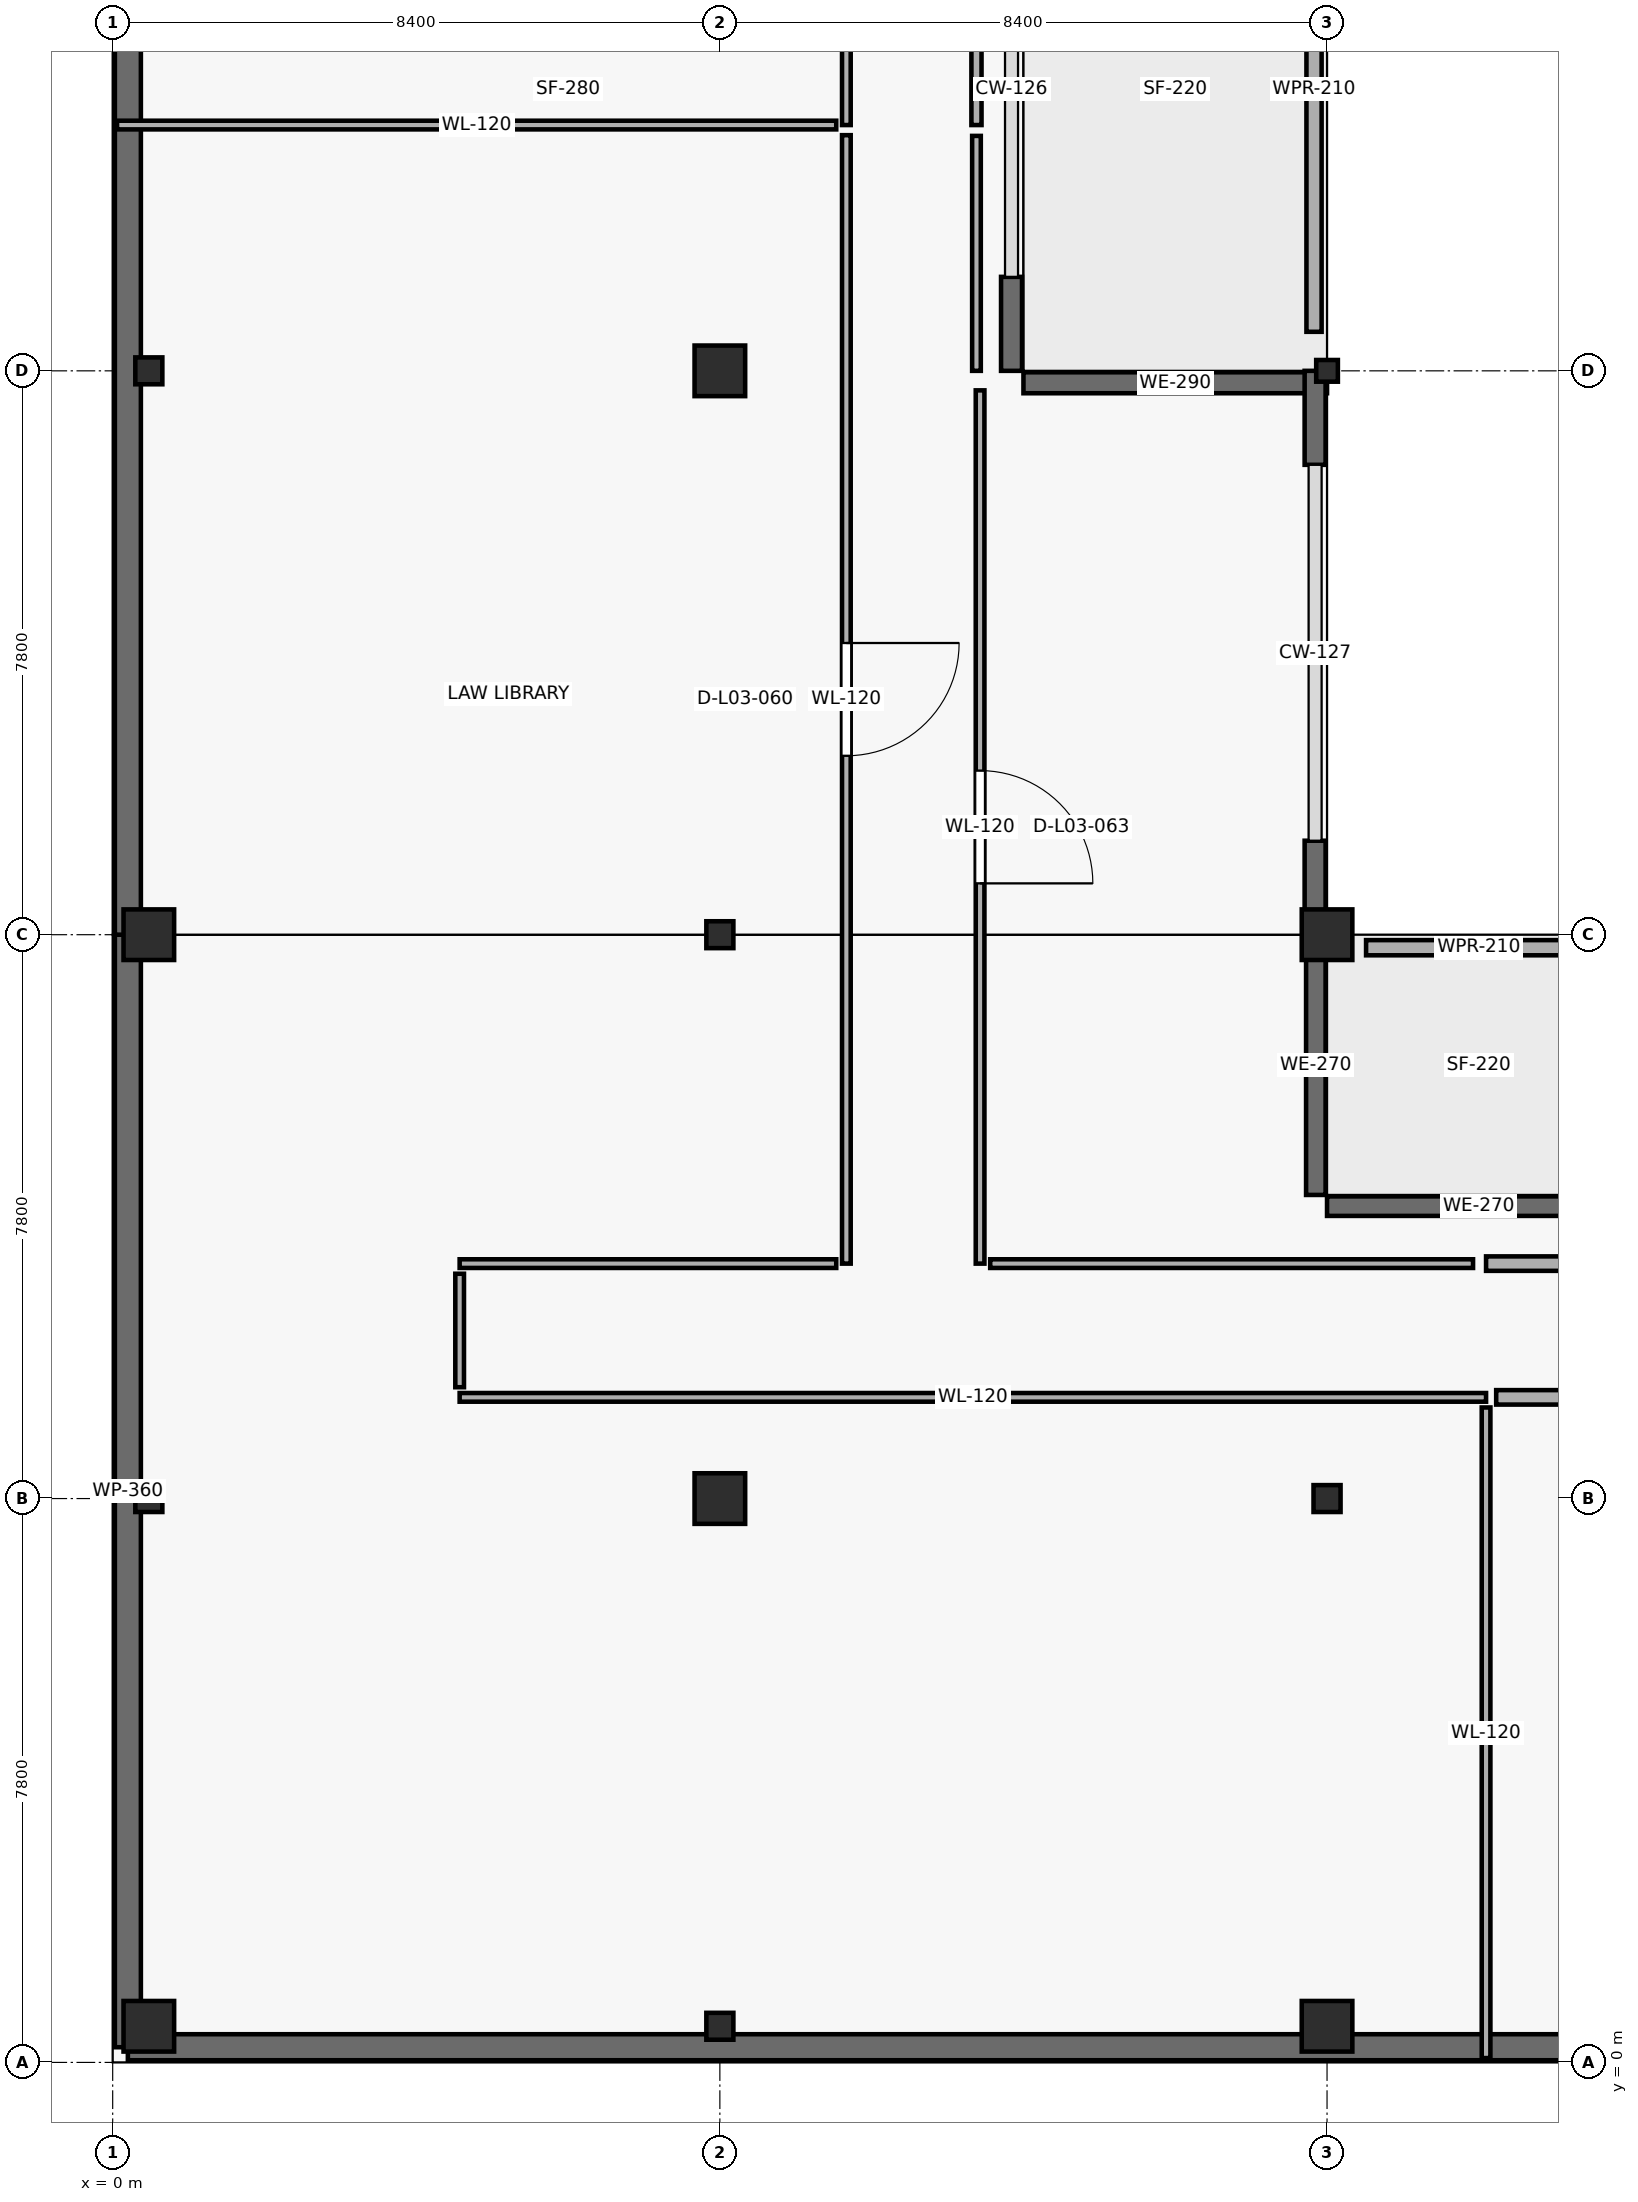
"""IFC4 building model, lengths in metres.
Left out: names, types, materials, properties, quantities, classifications, styles, units other than length and angle.
Written with IfcOpenShell. Run it as: python <this file> out.ifc"""

import sys

from ifc_helpers import new_model, si_unit, direction, frame, frame_2d, origin, origin_2d, place, context, subcontext, project, spatial, rectangle, hollow_rectangle, i_section, extrude, element, fill, save


model = new_model("IFC4")
c1 = context("Model", 3, precision=1e-05, world=origin(), true_north=direction((0.0, 1.0)))
c2 = subcontext(c1, "Body", "Model", "MODEL_VIEW")
j1 = project(units=[si_unit("LENGTHUNIT", "METRE"), si_unit("PLANEANGLEUNIT", "RADIAN")], contexts=[c1])
p1 = place(None, origin())
s1 = spatial("IfcSite", under=j1, at=p1, CompositionType="ELEMENT")
p2 = place(p1, origin())
s2 = spatial("IfcBuilding", under=s1, at=p2, CompositionType="ELEMENT")
p3 = place(p2, frame((0.0, 0.0, 10.2)))
s3 = spatial("IfcBuildingStorey", under=s2, at=p3, CompositionType="ELEMENT", Elevation=10.2)
p4 = place(p3, frame((0.5, 0.5, 0.0), z_axis=(0.0, 0.0, 1.0), x_axis=(1.0, 0.0, 0.0)))
e1 = element("IfcColumn", 1, at=p4, inside=s3, PredefinedType="COLUMN", context=c2, shape_type="SweptSolid", body=[
    extrude(rectangle(XDim=0.7, YDim=0.7, at=origin_2d()), origin(), (0.0, 0.0, 1.0), 5.1),
])
p5 = place(p3, frame((0.5, 7.8, 0.0), z_axis=(0.0, 0.0, 1.0), x_axis=(1.0, 0.0, 0.0)))
e2 = element("IfcColumn", 2, at=p5, inside=s3, PredefinedType="COLUMN", context=c2, shape_type="SweptSolid", body=[
    extrude(i_section(OverallWidth=0.374, OverallDepth=0.372, WebThickness=0.016, FlangeThickness=0.026, at=origin_2d()), origin(), (0.0, 0.0, 1.0), 5.1),
])
p6 = place(p3, frame((0.5, 15.6, 0.0), z_axis=(0.0, 0.0, 1.0), x_axis=(1.0, 0.0, 0.0)))
e3 = element("IfcColumn", 3, at=p6, inside=s3, PredefinedType="COLUMN", context=c2, shape_type="SweptSolid", body=[
    extrude(rectangle(XDim=0.7, YDim=0.7, at=origin_2d()), origin(), (0.0, 0.0, 1.0), 5.1),
])
for number, where, z_axis, x_axis in (
    (4, (0.5, 23.4, 0.0), (0.0, 0.0, 1.0), (1.0, 0.0, 0.0)),
    (5, (8.4, 0.5, 0.0), (0.0, 0.0, 1.0), (1.0, 0.0, 0.0)),
):
    element("IfcColumn", number, at=place(p3, frame(where, z_axis=z_axis, x_axis=x_axis)), inside=s3, PredefinedType="COLUMN", context=c2, shape_type="SweptSolid", body=[
        extrude(i_section(OverallWidth=0.374, OverallDepth=0.372, WebThickness=0.016, FlangeThickness=0.026, at=origin_2d()), origin(), (0.0, 0.0, 1.0), 5.1),
    ])
p7 = place(p3, frame((8.4, 7.8, 0.0), z_axis=(0.0, 0.0, 1.0), x_axis=(1.0, 0.0, 0.0)))
e6 = element("IfcColumn", 6, at=p7, inside=s3, PredefinedType="COLUMN", context=c2, shape_type="SweptSolid", body=[
    extrude(rectangle(XDim=0.7, YDim=0.7, at=origin_2d()), origin(), (0.0, 0.0, 1.0), 5.1),
])
p8 = place(p3, frame((8.4, 15.6, 0.0), z_axis=(0.0, 0.0, 1.0), x_axis=(1.0, 0.0, 0.0)))
e7 = element("IfcColumn", 7, at=p8, inside=s3, PredefinedType="COLUMN", context=c2, shape_type="SweptSolid", body=[
    extrude(i_section(OverallWidth=0.374, OverallDepth=0.372, WebThickness=0.016, FlangeThickness=0.026, at=origin_2d()), origin(), (0.0, 0.0, 1.0), 5.1),
])
for number, where, z_axis, x_axis in (
    (8, (8.4, 23.4, 0.0), (0.0, 0.0, 1.0), (1.0, 0.0, 0.0)),
    (9, (16.8, 0.5, 0.0), (0.0, 0.0, 1.0), (1.0, 0.0, 0.0)),
):
    element("IfcColumn", number, at=place(p3, frame(where, z_axis=z_axis, x_axis=x_axis)), inside=s3, PredefinedType="COLUMN", context=c2, shape_type="SweptSolid", body=[
        extrude(rectangle(XDim=0.7, YDim=0.7, at=origin_2d()), origin(), (0.0, 0.0, 1.0), 5.1),
    ])
p9 = place(p3, frame((16.8, 7.8, 0.0), z_axis=(0.0, 0.0, 1.0), x_axis=(1.0, 0.0, 0.0)))
e10 = element("IfcColumn", 10, at=p9, inside=s3, PredefinedType="COLUMN", context=c2, shape_type="SweptSolid", body=[
    extrude(i_section(OverallWidth=0.374, OverallDepth=0.372, WebThickness=0.016, FlangeThickness=0.026, at=origin_2d()), origin(), (0.0, 0.0, 1.0), 5.1),
])
p10 = place(p3, frame((16.8, 15.6, 0.0), z_axis=(0.0, 0.0, 1.0), x_axis=(1.0, 0.0, 0.0)))
e11 = element("IfcColumn", 11, at=p10, inside=s3, PredefinedType="COLUMN", context=c2, shape_type="SweptSolid", body=[
    extrude(rectangle(XDim=0.7, YDim=0.7, at=origin_2d()), origin(), (0.0, 0.0, 1.0), 5.1),
])
p11 = place(p3, frame((16.8, 23.4, 0.0), z_axis=(0.0, 0.0, 1.0), x_axis=(1.0, 0.0, 0.0)))
e12 = element("IfcColumn", 12, at=p11, inside=s3, PredefinedType="COLUMN", context=c2, shape_type="SweptSolid", body=[
    extrude(hollow_rectangle(XDim=0.3, YDim=0.3, WallThickness=0.012, at=origin_2d()), origin(), (0.0, 0.0, 1.0), 5.1),
])
p12 = place(p3, frame((12.435, 24.7, 0.0), z_axis=(0.0, 0.0, 1.0), x_axis=(0.0, -1.0, 0.0)))
e13 = element("IfcWall", 13, at=p12, inside=s3, PredefinedType="SOLIDWALL", context=c2, shape_type="SweptSolid", body=[
    extrude(rectangle(XDim=1.3, YDim=0.29, at=frame_2d((0.65, 0.0))), origin(), (0.0, 0.0, 1.0), 4.82),
])
p13 = place(p3, frame((12.6, 23.235, 0.0), z_axis=(0.0, 0.0, 1.0), x_axis=(1.0, 0.0, 0.0)))
e14 = element("IfcWall", 14, at=p13, inside=s3, PredefinedType="SOLIDWALL", context=c2, shape_type="SweptSolid", body=[
    extrude(rectangle(XDim=4.2, YDim=0.29, at=frame_2d((2.1, 0.0))), origin(), (0.0, 0.0, 1.0), 4.82),
])
for number, where, z_axis, x_axis in (
    (15, (16.635, 23.4, 0.0), (0.0, 0.0, 1.0), (0.0, -1.0, 0.0)),
    (16, (16.635, 16.9, 0.0), (0.0, 0.0, 1.0), (0.0, -1.0, 0.0)),
):
    element("IfcWall", number, at=place(p3, frame(where, z_axis=z_axis, x_axis=x_axis)), inside=s3, PredefinedType="SOLIDWALL", context=c2, shape_type="SweptSolid", body=[
        extrude(rectangle(XDim=1.3, YDim=0.29, at=frame_2d((0.65, 0.0))), origin(), (0.0, 0.0, 1.0), 4.82),
    ])
p14 = place(p3, frame((16.645, 15.6, 0.0), z_axis=(0.0, 0.0, 1.0), x_axis=(0.0, -1.0, 0.0)))
e17 = element("IfcWall", 17, at=p14, inside=s3, PredefinedType="SOLIDWALL", context=c2, shape_type="SweptSolid", body=[
    extrude(rectangle(XDim=3.6, YDim=0.27, at=frame_2d((1.8, 0.0))), origin(), (0.0, 0.0, 1.0), 4.82),
])
p15 = place(p3, frame((16.8, 11.845, 0.0), z_axis=(0.0, 0.0, 1.0), x_axis=(1.0, 0.0, 0.0)))
e18 = element("IfcWall", 18, at=p15, inside=s3, PredefinedType="SOLIDWALL", context=c2, shape_type="SweptSolid", body=[
    extrude(rectangle(XDim=4.2, YDim=0.27, at=frame_2d((2.1, 0.0))), origin(), (0.0, 0.0, 1.0), 4.82),
])
p16 = place(p3, frame((42.0, 0.21, 0.0), z_axis=(0.0, 0.0, 1.0), x_axis=(-1.0, 0.0, 0.0)))
e19 = element("IfcWall", 19, at=p16, inside=s3, PredefinedType="SOLIDWALL", context=c2, shape_type="SweptSolid", body=[
    extrude(rectangle(XDim=41.79, YDim=0.36, at=frame_2d((20.895, 0.0))), origin(), (0.0, 0.0, 1.0), 4.82),
])
p17 = place(p3, frame((0.21, 0.21, 0.0), z_axis=(0.0, 0.0, 1.0), x_axis=(0.0, 1.0, 0.0)))
e20 = element("IfcWall", 20, at=p17, inside=s3, PredefinedType="SOLIDWALL", context=c2, shape_type="SweptSolid", body=[
    extrude(rectangle(XDim=15.39, YDim=0.36, at=frame_2d((7.695, 0.0))), origin(), (0.0, 0.0, 1.0), 4.82),
])
p18 = place(p3, frame((0.21, 15.6, 0.0), z_axis=(0.0, 0.0, 1.0), x_axis=(0.0, 1.0, 0.0)))
e21 = element("IfcWall", 21, at=p18, inside=s3, PredefinedType="SOLIDWALL", context=c2, shape_type="SweptSolid", body=[
    extrude(rectangle(XDim=40.8, YDim=0.36, at=frame_2d((20.4, 0.0))), origin(), (0.0, 0.0, 1.0), 4.82),
])
p19 = place(p3, frame((17.34, 15.42, 0.0), z_axis=(0.0, 0.0, 1.0), x_axis=(1.0, 0.0, 0.0)))
e22 = element("IfcWall", 22, at=p19, inside=s3, PredefinedType="PARAPET", context=c2, shape_type="SweptSolid", body=[
    extrude(rectangle(XDim=3.12, YDim=0.21, at=frame_2d((1.56, 0.0))), origin(), (0.0, 0.0, 1.0), 1.12),
])
p20 = place(p3, frame((16.62, 30.66, 0.0), z_axis=(0.0, 0.0, 1.0), x_axis=(0.0, -1.0, 0.0)))
e23 = element("IfcWall", 23, at=p20, inside=s3, PredefinedType="PARAPET", context=c2, shape_type="SweptSolid", body=[
    extrude(rectangle(XDim=6.72, YDim=0.21, at=frame_2d((3.36, 0.0))), origin(), (0.0, 0.0, 1.0), 1.12),
])
p21 = place(p3, frame((10.15, 45.8, 0.0), z_axis=(0.0, 0.0, 1.0), x_axis=(0.0, -1.0, 0.0)))
e24 = element("IfcWall", 24, at=p21, inside=s3, PredefinedType="PARTITIONING", context=c2, shape_type="SweptSolid", body=[
    extrude(rectangle(XDim=19.0, YDim=0.12, at=frame_2d((9.5, 0.0))), origin(), (0.0, 0.0, 1.0), 4.82),
])
p22 = place(p21, frame((8.72, 0.0, 0.0)))
e25 = element("IfcOpeningElement", 25, at=p22, cuts=e24, PredefinedType="OPENING", context=c2, shape_type="SweptSolid", body=[
    extrude(rectangle(XDim=1.56, YDim=2.44, at=frame_2d((0.78, 1.22))), frame((0.0, 0.07, 0.0), z_axis=(0.0, -1.0, 0.0), x_axis=(1.0, 0.0, 0.0)), (0.0, 0.0, 1.0), 0.14),
])
p23 = place(p3, frame((10.15, 26.66, 0.0), z_axis=(0.0, 0.0, 1.0), x_axis=(0.0, -1.0, 0.0)))
e26 = element("IfcWall", 26, at=p23, inside=s3, PredefinedType="PARTITIONING", context=c2, shape_type="SweptSolid", body=[
    extrude(rectangle(XDim=15.61, YDim=0.12, at=frame_2d((7.805, 0.0))), origin(), (0.0, 0.0, 1.0), 4.82),
])
p24 = place(p23, frame((7.025, 0.0, 0.0)))
e27 = element("IfcOpeningElement", 27, at=p24, cuts=e26, PredefinedType="OPENING", context=c2, shape_type="SweptSolid", body=[
    extrude(rectangle(XDim=1.56, YDim=2.44, at=frame_2d((0.78, 1.22))), frame((0.0, 0.07, 0.0), z_axis=(0.0, -1.0, 0.0), x_axis=(1.0, 0.0, 0.0)), (0.0, 0.0, 1.0), 0.14),
])
p25 = place(p3, frame((4.8, 9.2, 0.0), z_axis=(0.0, 0.0, 1.0), x_axis=(1.0, 0.0, 0.0)))
e28 = element("IfcWall", 28, at=p25, inside=s3, PredefinedType="PARTITIONING", context=c2, shape_type="SweptSolid", body=[
    extrude(rectangle(XDim=14.2, YDim=0.12, at=frame_2d((7.1, 0.0))), origin(), (0.0, 0.0, 1.0), 4.82),
])
p26 = place(p3, frame((12.0, 11.05, 0.0), z_axis=(0.0, 0.0, 1.0), x_axis=(0.0, 1.0, 0.0)))
e29 = element("IfcWall", 29, at=p26, inside=s3, PredefinedType="PARTITIONING", context=c2, shape_type="SweptSolid", body=[
    extrude(rectangle(XDim=12.08, YDim=0.12, at=frame_2d((6.04, 0.0))), origin(), (0.0, 0.0, 1.0), 4.82),
])
p27 = place(p26, frame((5.26, 0.0, 0.0)))
e30 = element("IfcOpeningElement", 30, at=p27, cuts=e29, PredefinedType="OPENING", context=c2, shape_type="SweptSolid", body=[
    extrude(rectangle(XDim=1.56, YDim=2.44, at=frame_2d((0.78, 1.22))), frame((0.0, 0.07, 0.0), z_axis=(0.0, -1.0, 0.0), x_axis=(1.0, 0.0, 0.0)), (0.0, 0.0, 1.0), 0.14),
])
p28 = place(p3, frame((0.06, 26.8, 0.0), z_axis=(0.0, 0.0, 1.0), x_axis=(1.0, 0.0, 0.0)))
e31 = element("IfcWall", 31, at=p28, inside=s3, PredefinedType="PARTITIONING", context=c2, shape_type="SweptSolid", body=[
    extrude(rectangle(XDim=9.95, YDim=0.12, at=frame_2d((4.975, 0.0))), origin(), (0.0, 0.0, 1.0), 4.82),
])
p29 = place(p3, frame((19.0, 9.06, 0.0), z_axis=(0.0, 0.0, 1.0), x_axis=(0.0, -1.0, 0.0)))
e32 = element("IfcWall", 32, at=p29, inside=s3, PredefinedType="PARTITIONING", context=c2, shape_type="SweptSolid", body=[
    extrude(rectangle(XDim=9.0, YDim=0.12, at=frame_2d((4.5, 0.0))), origin(), (0.0, 0.0, 1.0), 4.82),
])
p30 = place(p3, frame((19.14, 9.2, 0.0), z_axis=(0.0, 0.0, 1.0), x_axis=(1.0, 0.0, 0.0)))
e33 = element("IfcWall", 33, at=p30, inside=s3, PredefinedType="PARTITIONING", context=c2, shape_type="SweptSolid", body=[
    extrude(rectangle(XDim=7.06, YDim=0.2, at=frame_2d((3.53, 0.0))), origin(), (0.0, 0.0, 1.0), 4.82),
])
p31 = place(p30, frame((3.04, 0.0, 0.0)))
e34 = element("IfcOpeningElement", 34, at=p31, cuts=e33, PredefinedType="OPENING", context=c2, shape_type="SweptSolid", body=[
    extrude(rectangle(XDim=0.98, YDim=2.12, at=frame_2d((0.49, 1.06))), frame((0.0, 0.11, 0.0), z_axis=(0.0, -1.0, 0.0), x_axis=(1.0, 0.0, 0.0)), (0.0, 0.0, 1.0), 0.22),
])
p32 = place(p3, frame((26.2, 11.05, 0.0), z_axis=(0.0, 0.0, 1.0), x_axis=(-1.0, 0.0, 0.0)))
e35 = element("IfcWall", 35, at=p32, inside=s3, PredefinedType="PARTITIONING", context=c2, shape_type="SweptSolid", body=[
    extrude(rectangle(XDim=7.2, YDim=0.2, at=frame_2d((3.6, 0.0))), origin(), (0.0, 0.0, 1.0), 4.0),
])
p33 = place(p32, frame((1.744, 0.0, 0.0)))
e36 = element("IfcOpeningElement", 36, at=p33, cuts=e35, PredefinedType="OPENING", context=c2, shape_type="SweptSolid", body=[
    extrude(rectangle(XDim=1.12, YDim=2.15, at=frame_2d((0.56, 1.075))), frame((0.0, 0.11, 0.0), z_axis=(0.0, -1.0, 0.0), x_axis=(1.0, 0.0, 0.0)), (0.0, 0.0, 1.0), 0.22),
])
p34 = place(p3, frame((18.82, 11.05, 0.0), z_axis=(0.0, 0.0, 1.0), x_axis=(-1.0, 0.0, 0.0)))
e37 = element("IfcWall", 37, at=p34, inside=s3, PredefinedType="PARTITIONING", context=c2, shape_type="SweptSolid", body=[
    extrude(rectangle(XDim=6.68, YDim=0.12, at=frame_2d((3.34, 0.0))), origin(), (0.0, 0.0, 1.0), 4.82),
])
p35 = place(p3, frame((10.01, 11.05, 0.0), z_axis=(0.0, 0.0, 1.0), x_axis=(-1.0, 0.0, 0.0)))
e38 = element("IfcWall", 38, at=p35, inside=s3, PredefinedType="PARTITIONING", context=c2, shape_type="SweptSolid", body=[
    extrude(rectangle(XDim=5.21, YDim=0.12, at=frame_2d((2.605, 0.0))), origin(), (0.0, 0.0, 1.0), 4.82),
])
p36 = place(p3, frame((11.95, 26.8, 0.0), z_axis=(0.0, 0.0, 1.0), x_axis=(0.0, 1.0, 0.0)))
e39 = element("IfcWall", 39, at=p36, inside=s3, PredefinedType="PARTITIONING", context=c2, shape_type="SweptSolid", body=[
    extrude(rectangle(XDim=4.4, YDim=0.14, at=frame_2d((2.2, 0.0))), origin(), (0.0, 0.0, 1.0), 4.82),
])
p37 = place(p3, frame((11.95, 23.4, 0.0), z_axis=(0.0, 0.0, 1.0), x_axis=(0.0, 1.0, 0.0)))
e40 = element("IfcWall", 40, at=p37, inside=s3, PredefinedType="PARTITIONING", context=c2, shape_type="SweptSolid", body=[
    extrude(rectangle(XDim=3.25, YDim=0.12, at=frame_2d((1.625, 0.0))), origin(), (0.0, 0.0, 1.0), 4.82),
])
p38 = place(p3, frame((4.8, 10.91, 0.0), z_axis=(0.0, 0.0, 1.0), x_axis=(0.0, -1.0, 0.0)))
e41 = element("IfcWall", 41, at=p38, inside=s3, PredefinedType="PARTITIONING", context=c2, shape_type="SweptSolid", body=[
    extrude(rectangle(XDim=1.57, YDim=0.12, at=frame_2d((0.785, 0.0))), origin(), (0.0, 0.0, 1.0), 4.82),
])
p39 = place(p24, origin())
e42 = element("IfcDoor", 42, at=p39, inside=s3, OperationType="SINGLE_SWING_LEFT", PredefinedType="DOOR", context=c2, shape_type="SweptSolid", body=[
    extrude(rectangle(XDim=1.56, YDim=2.44, at=frame_2d((0.78, 1.22))), frame((0.0, 0.025, 0.0), z_axis=(0.0, -1.0, 0.0), x_axis=(1.0, 0.0, 0.0)), (0.0, 0.0, 1.0), 0.05),
])
fill(e27, e42)
p40 = place(p27, origin())
e43 = element("IfcDoor", 43, at=p40, inside=s3, OperationType="SINGLE_SWING_RIGHT", PredefinedType="DOOR", context=c2, shape_type="SweptSolid", body=[
    extrude(rectangle(XDim=1.56, YDim=2.44, at=frame_2d((0.78, 1.22))), frame((0.0, 0.025, 0.0), z_axis=(0.0, -1.0, 0.0), x_axis=(1.0, 0.0, 0.0)), (0.0, 0.0, 1.0), 0.05),
])
fill(e30, e43)
save(model, sys.argv[1])
